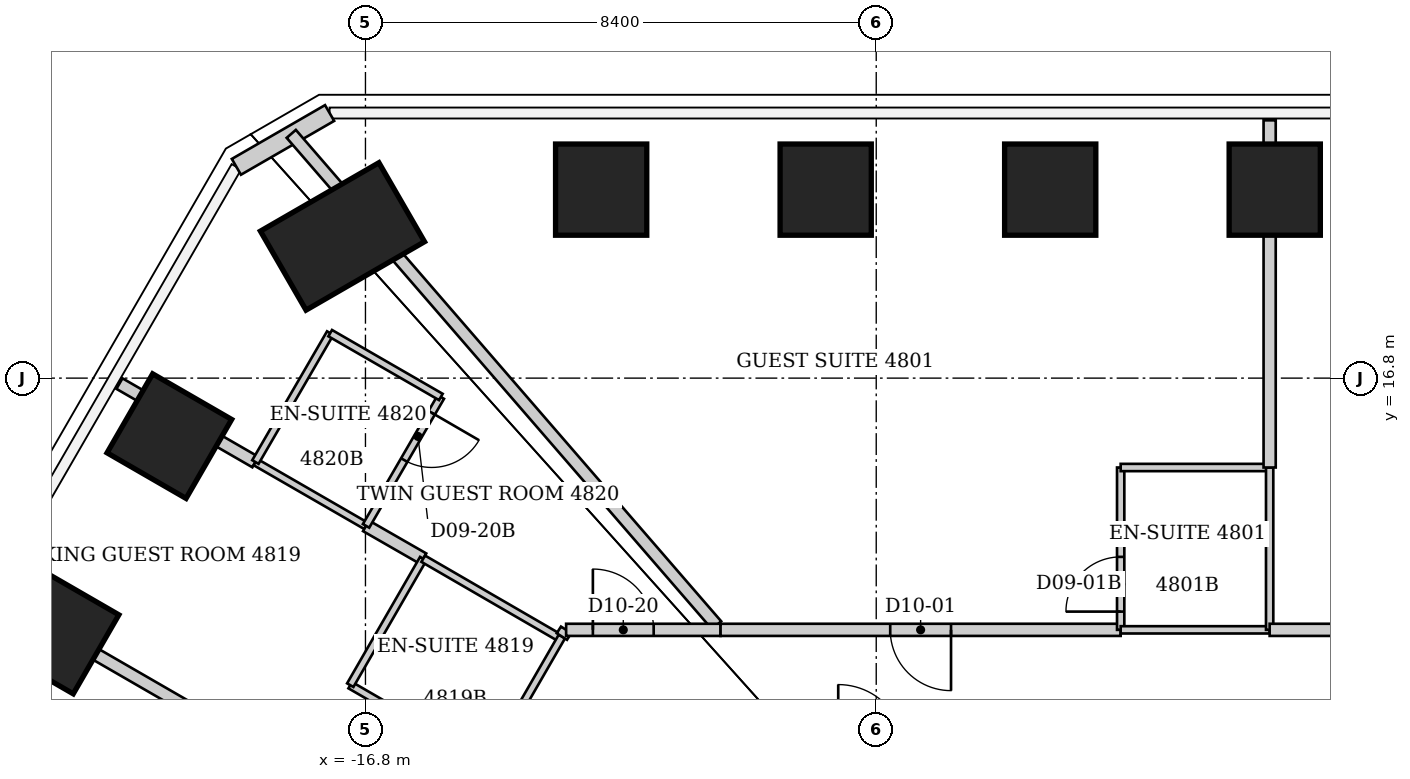
"""IFC4 building model, lengths in metres.
Left out: names, types, materials, properties, quantities, classifications, styles, units other than length and angle.
Written with IfcOpenShell. Run it as: python <this file> out.ifc"""

import sys

from ifc_helpers import new_model, si_unit, direction, frame, frame_2d, origin, origin_2d, place, context, subcontext, project, spatial, rectangle, extrude, element, fill, save


model = new_model("IFC4")
c1 = context("Model", 3, precision=1e-05, world=origin(), true_north=direction((0.0, 1.0)))
c2 = subcontext(c1, "Body", "Model", "MODEL_VIEW")
j1 = project(units=[si_unit("LENGTHUNIT", "METRE"), si_unit("PLANEANGLEUNIT", "RADIAN")], contexts=[c1])
p1 = place(None, origin())
s1 = spatial("IfcSite", under=j1, at=p1, CompositionType="ELEMENT")
p2 = place(p1, origin())
s2 = spatial("IfcBuilding", under=s1, at=p2, CompositionType="ELEMENT")
p3 = place(p2, frame((0.0, 0.0, 194.6)))
s3 = spatial("IfcBuildingStorey", under=s2, at=p3, CompositionType="ELEMENT", Elevation=194.6)
for number, where, z_axis, x_axis in (
    (1, (-12.924, 19.9, 0.0), (0.0, 0.0, 1.0), (0.0, 1.0, 0.0)),
    (2, (-9.231, 19.9, 0.0), (0.0, 0.0, 1.0), (0.0, 1.0, 0.0)),
    (3, (-5.539, 19.9, 0.0), (0.0, 0.0, 1.0), (0.0, 1.0, 0.0)),
    (4, (-1.846, 19.9, 0.0), (0.0, 0.0, 1.0), (0.0, 1.0, 0.0)),
    (5, (-21.88, 12.633, 0.0), (0.0, 0.0, 1.0), (-0.866, 0.5, 0.0)),
    (6, (-20.025, 15.846, 0.0), (0.0, 0.0, 1.0), (-0.866, 0.5, 0.0)),
):
    element("IfcColumn", number, at=place(p3, frame(where, z_axis=z_axis, x_axis=x_axis)), inside=s3, PredefinedType="COLUMN", context=c2, shape_type="SweptSolid", body=[
        extrude(rectangle(XDim=1.5, YDim=1.5, at=origin_2d()), origin(), (0.0, 0.0, 1.0), 3.8),
    ])
p4 = place(p3, frame((-17.178, 19.131, 0.0), z_axis=(0.0, 0.0, 1.0), x_axis=(-0.5, 0.866025403784, 0.0)))
e7 = element("IfcColumn", 7, at=p4, inside=s3, PredefinedType="COLUMN", context=c2, shape_type="SweptSolid", body=[
    extrude(rectangle(XDim=1.5, YDim=2.25, at=origin_2d()), origin(), (0.0, 0.0, 1.0), 3.8),
])
p5 = place(p3, frame((-18.923, 20.275, 0.0), z_axis=(0.0, 0.0, 1.0), x_axis=(0.866036293601, 0.499981137809, 0.0)))
e8 = element("IfcWall", 8, at=p5, inside=s3, PredefinedType="SOLIDWALL", context=c2, shape_type="SweptSolid", body=[
    extrude(rectangle(XDim=1.77, YDim=0.3, at=frame_2d((0.885, 0.0))), origin(), (0.0, 0.0, 1.0), 3.64),
])
p6 = place(p3, frame((-22.866, 13.2, 0.0), z_axis=(0.0, 0.0, 1.0), x_axis=(0.865937714159, -0.500151852138, 0.0)))
e9 = element("IfcWall", 9, at=p6, inside=s3, PredefinedType="PARTITIONING", context=c2, shape_type="SweptSolid", body=[
    extrude(rectangle(XDim=5.758, YDim=0.2, at=frame_2d((2.879, 0.0))), origin(), (0.0, 0.0, 1.0), 2.878),
])
p7 = place(p3, frame((-20.846, 16.71, 0.0), z_axis=(0.0, 0.0, 1.0), x_axis=(0.866163541035, -0.499760662899, 0.0)))
e10 = element("IfcWall", 10, at=p7, inside=s3, PredefinedType="PARTITIONING", context=c2, shape_type="SweptSolid", body=[
    extrude(rectangle(XDim=2.581, YDim=0.2, at=frame_2d((1.291, 0.0))), origin(), (0.0, 0.0, 1.0), 3.64),
])
p8 = place(p3, frame((-18.61, 15.42, 0.0), z_axis=(0.0, 0.0, 1.0), x_axis=(0.86618365172, -0.499725806311, 0.0)))
e11 = element("IfcWall", 11, at=p8, inside=s3, PredefinedType="PARTITIONING", context=c2, shape_type="SweptSolid", body=[
    extrude(rectangle(XDim=2.101, YDim=0.12, at=frame_2d((1.051, 0.0))), origin(), (0.0, 0.0, 1.0), 3.64),
])
p9 = place(p3, frame((-17.38, 17.54, 0.0), z_axis=(0.0, 0.0, 1.0), x_axis=(-0.501888006485, -0.864932615264, 0.0)))
e12 = element("IfcWall", 12, at=p9, inside=s3, PredefinedType="PARTITIONING", context=c2, shape_type="SweptSolid", body=[
    extrude(rectangle(XDim=2.451, YDim=0.12, at=frame_2d((1.226, 0.0))), origin(), (0.0, 0.0, 1.0), 3.64),
])
p10 = place(p3, frame((-17.05, 11.75, 0.0), z_axis=(0.0, 0.0, 1.0), x_axis=(0.865155281359, -0.50150407689, 0.0)))
e13 = element("IfcWall", 13, at=p10, inside=s3, PredefinedType="PARTITIONING", context=c2, shape_type="SweptSolid", body=[
    extrude(rectangle(XDim=2.612, YDim=0.12, at=frame_2d((1.306, 0.0))), origin(), (0.0, 0.0, 1.0), 3.64),
])
p11 = place(p10, frame((1.412, 0.0, 0.0)))
e14 = element("IfcOpeningElement", 14, at=p11, cuts=e13, PredefinedType="OPENING", context=c2, shape_type="SweptSolid", body=[
    extrude(rectangle(XDim=0.9, YDim=2.03, at=frame_2d((0.45, 1.015))), frame((0.0, 0.06, 0.0), z_axis=(0.0, -1.0, 0.0), x_axis=(1.0, 0.0, 0.0)), (0.0, 0.0, 1.0), 0.12),
])
p12 = place(p3, frame((-16.79, 14.37, 0.0), z_axis=(0.0, 0.0, 1.0), x_axis=(0.867132442133, -0.498077632303, 0.0)))
e15 = element("IfcWall", 15, at=p12, inside=s3, PredefinedType="PARTITIONING", context=c2, shape_type="SweptSolid", body=[
    extrude(rectangle(XDim=1.084, YDim=0.2, at=frame_2d((0.542, 0.0))), origin(), (0.0, 0.0, 1.0), 3.64),
])
p13 = place(p3, frame((-16.79, 14.37, 0.0), z_axis=(0.0, 0.0, 1.0), x_axis=(0.501856726365, 0.86495076519, 0.0)))
e16 = element("IfcWall", 16, at=p13, inside=s3, PredefinedType="PARTITIONING", context=c2, shape_type="SweptSolid", body=[
    extrude(rectangle(XDim=2.451, YDim=0.12, at=frame_2d((1.226, 0.0))), origin(), (0.0, 0.0, 1.0), 3.64),
])
p14 = place(p13, frame((1.251, 0.0, 0.0)))
e17 = element("IfcOpeningElement", 17, at=p14, cuts=e16, PredefinedType="OPENING", context=c2, shape_type="SweptSolid", body=[
    extrude(rectangle(XDim=0.9, YDim=2.03, at=frame_2d((0.45, 1.015))), frame((0.0, 0.06, 0.0), z_axis=(0.0, -1.0, 0.0), x_axis=(1.0, 0.0, 0.0)), (0.0, 0.0, 1.0), 0.12),
])
p15 = place(p3, frame((-15.85, 13.83, 0.0), z_axis=(0.0, 0.0, 1.0), x_axis=(-0.499693115345, -0.866202511239, 0.0)))
e18 = element("IfcWall", 18, at=p15, inside=s3, PredefinedType="PARTITIONING", context=c2, shape_type="SweptSolid", body=[
    extrude(rectangle(XDim=2.401, YDim=0.12, at=frame_2d((1.201, 0.0))), origin(), (0.0, 0.0, 1.0), 3.64),
])
p16 = place(p3, frame((-15.85, 13.83, 0.0), z_axis=(0.0, 0.0, 1.0), x_axis=(0.865155281359, -0.50150407689, 0.0)))
e19 = element("IfcWall", 19, at=p16, inside=s3, PredefinedType="PARTITIONING", context=c2, shape_type="SweptSolid", body=[
    extrude(rectangle(XDim=2.612, YDim=0.12, at=frame_2d((1.306, 0.0))), origin(), (0.0, 0.0, 1.0), 3.64),
])
p17 = place(p3, frame((-15.56, 16.49, 0.0), z_axis=(0.0, 0.0, 1.0), x_axis=(-0.86618365172, 0.499725806311, 0.0)))
e20 = element("IfcWall", 20, at=p17, inside=s3, PredefinedType="PARTITIONING", context=c2, shape_type="SweptSolid", body=[
    extrude(rectangle(XDim=2.101, YDim=0.12, at=frame_2d((1.051, 0.0))), origin(), (0.0, 0.0, 1.0), 3.64),
])
p18 = place(p3, frame((-14.789, 10.439, 0.0), z_axis=(0.0, 0.0, 1.0), x_axis=(0.499942119333, 0.866058818624, 0.0)))
e21 = element("IfcWall", 21, at=p18, inside=s3, PredefinedType="PARTITIONING", context=c2, shape_type="SweptSolid", body=[
    extrude(rectangle(XDim=2.437, YDim=0.12, at=frame_2d((1.219, 0.0))), origin(), (0.0, 0.0, 1.0), 3.64),
])
p19 = place(p3, frame((-13.5, 12.66, 0.0), z_axis=(0.0, 0.0, 1.0), x_axis=(-0.537723852201, -0.843121022614, 0.0)))
e22 = element("IfcWall", 22, at=p19, inside=s3, PredefinedType="PARTITIONING", context=c2, shape_type="SweptSolid", body=[
    extrude(rectangle(XDim=0.13, YDim=0.2, at=frame_2d((0.065, 0.0))), origin(), (0.0, 0.0, 1.0), 3.64),
])
p20 = place(p3, frame((-11.025, 12.736, 0.0), z_axis=(0.0, 0.0, 1.0), x_axis=(-0.654431245438, 0.756121514702, 0.0)))
e23 = element("IfcWall", 23, at=p20, inside=s3, PredefinedType="PARTITIONING", context=c2, shape_type="SweptSolid", body=[
    extrude(rectangle(XDim=10.688, YDim=0.2, at=frame_2d((5.344, 0.0))), origin(), (0.0, 0.0, 1.0), 3.64),
])
p21 = place(p3, frame((-10.96, 12.66, 0.0), z_axis=(0.0, 0.0, 1.0), x_axis=(-1.0, 0.0, 0.0)))
e24 = element("IfcWall", 24, at=p21, inside=s3, PredefinedType="PARTITIONING", context=c2, shape_type="SweptSolid", body=[
    extrude(rectangle(XDim=2.54, YDim=0.2, at=frame_2d((1.27, 0.0))), origin(), (0.0, 0.0, 1.0), 3.64),
])
p22 = place(p21, frame((1.1, 0.0, 0.0)))
e25 = element("IfcOpeningElement", 25, at=p22, cuts=e24, PredefinedType="OPENING", context=c2, shape_type="SweptSolid", body=[
    extrude(rectangle(XDim=1.0, YDim=2.13, at=frame_2d((0.5, 1.065))), frame((0.0, 0.1, 0.0), z_axis=(0.0, -1.0, 0.0), x_axis=(1.0, 0.0, 0.0)), (0.0, 0.0, 1.0), 0.2),
])
p23 = place(p3, frame((-4.38, 12.66, 0.0), z_axis=(0.0, 0.0, 1.0), x_axis=(-1.0, 0.0, 0.0)))
e26 = element("IfcWall", 26, at=p23, inside=s3, PredefinedType="PARTITIONING", context=c2, shape_type="SweptSolid", body=[
    extrude(rectangle(XDim=6.58, YDim=0.2, at=frame_2d((3.29, 0.0))), origin(), (0.0, 0.0, 1.0), 3.64),
])
p24 = place(p23, frame((2.79, 0.0, 0.0)))
e27 = element("IfcOpeningElement", 27, at=p24, cuts=e26, PredefinedType="OPENING", context=c2, shape_type="SweptSolid", body=[
    extrude(rectangle(XDim=1.0, YDim=2.13, at=frame_2d((0.5, 1.065))), frame((0.0, 0.1, 0.0), z_axis=(0.0, -1.0, 0.0), x_axis=(1.0, 0.0, 0.0)), (0.0, 0.0, 1.0), 0.2),
])
p25 = place(p3, frame((-4.38, 15.33, 0.0), z_axis=(0.0, 0.0, 1.0), x_axis=(0.0, -1.0, 0.0)))
e28 = element("IfcWall", 28, at=p25, inside=s3, PredefinedType="PARTITIONING", context=c2, shape_type="SweptSolid", body=[
    extrude(rectangle(XDim=2.67, YDim=0.12, at=frame_2d((1.335, 0.0))), origin(), (0.0, 0.0, 1.0), 3.64),
])
p26 = place(p25, frame((1.47, 0.0, 0.0)))
e29 = element("IfcOpeningElement", 29, at=p26, cuts=e28, PredefinedType="OPENING", context=c2, shape_type="SweptSolid", body=[
    extrude(rectangle(XDim=0.9, YDim=2.03, at=frame_2d((0.45, 1.015))), frame((0.0, 0.06, 0.0), z_axis=(0.0, -1.0, 0.0), x_axis=(1.0, 0.0, 0.0)), (0.0, 0.0, 1.0), 0.12),
])
for number, where, z_axis, x_axis in (
    (30, (-1.93, 12.66, 0.0), (0.0, 0.0, 1.0), (-1.0, 0.0, 0.0)),
    (31, (-1.93, 15.33, 0.0), (0.0, 0.0, 1.0), (-1.0, 0.0, 0.0)),
):
    element("IfcWall", number, at=place(p3, frame(where, z_axis=z_axis, x_axis=x_axis)), inside=s3, PredefinedType="PARTITIONING", context=c2, shape_type="SweptSolid", body=[
        extrude(rectangle(XDim=2.45, YDim=0.12, at=frame_2d((1.225, 0.0))), origin(), (0.0, 0.0, 1.0), 3.64),
    ])
p27 = place(p3, frame((-1.93, 15.33, 0.0), z_axis=(0.0, 0.0, 1.0), x_axis=(0.0, -1.0, 0.0)))
e32 = element("IfcWall", 32, at=p27, inside=s3, PredefinedType="PARTITIONING", context=c2, shape_type="SweptSolid", body=[
    extrude(rectangle(XDim=2.67, YDim=0.12, at=frame_2d((1.335, 0.0))), origin(), (0.0, 0.0, 1.0), 3.023),
])
p28 = place(p3, frame((-1.93, 21.04, 0.0), z_axis=(0.0, 0.0, 1.0), x_axis=(0.0, -1.0, 0.0)))
e33 = element("IfcWall", 33, at=p28, inside=s3, PredefinedType="PARTITIONING", context=c2, shape_type="SweptSolid", body=[
    extrude(rectangle(XDim=5.71, YDim=0.2, at=frame_2d((2.855, 0.0))), origin(), (0.0, 0.0, 1.0), 3.023),
])
p29 = place(p3, frame((3.35, 12.66, 0.0), z_axis=(0.0, 0.0, 1.0), x_axis=(-1.0, 0.0, 0.0)))
e34 = element("IfcWall", 34, at=p29, inside=s3, PredefinedType="PARTITIONING", context=c2, shape_type="SweptSolid", body=[
    extrude(rectangle(XDim=5.28, YDim=0.2, at=frame_2d((2.64, 0.0))), origin(), (0.0, 0.0, 1.0), 3.64),
])
p30 = place(p29, frame((2.14, 0.0, 0.0)))
e35 = element("IfcOpeningElement", 35, at=p30, cuts=e34, PredefinedType="OPENING", context=c2, shape_type="SweptSolid", body=[
    extrude(rectangle(XDim=1.0, YDim=2.13, at=frame_2d((0.5, 1.065))), frame((0.0, 0.1, 0.0), z_axis=(0.0, -1.0, 0.0), x_axis=(1.0, 0.0, 0.0)), (0.0, 0.0, 1.0), 0.2),
])
p31 = place(p24, origin())
e36 = element("IfcDoor", 36, at=p31, inside=s3, OperationType="SINGLE_SWING_LEFT", PredefinedType="DOOR", context=c2, shape_type="SweptSolid", body=[
    extrude(rectangle(XDim=1.0, YDim=2.13, at=frame_2d((0.5, 1.065))), frame((0.0, 0.025, 0.0), z_axis=(0.0, -1.0, 0.0), x_axis=(1.0, 0.0, 0.0)), (0.0, 0.0, 1.0), 0.05),
])
fill(e27, e36)
p32 = place(p26, origin())
e37 = element("IfcDoor", 37, at=p32, inside=s3, OperationType="SINGLE_SWING_RIGHT", PredefinedType="DOOR", context=c2, shape_type="SweptSolid", body=[
    extrude(rectangle(XDim=0.9, YDim=2.03, at=frame_2d((0.45, 1.015))), frame((0.0, 0.025, 0.0), z_axis=(0.0, -1.0, 0.0), x_axis=(1.0, 0.0, 0.0)), (0.0, 0.0, 1.0), 0.05),
])
fill(e29, e37)
p33 = place(p22, origin())
e38 = element("IfcDoor", 38, at=p33, inside=s3, OperationType="SINGLE_SWING_RIGHT", PredefinedType="DOOR", context=c2, shape_type="SweptSolid", body=[
    extrude(rectangle(XDim=1.0, YDim=2.13, at=frame_2d((0.5, 1.065))), frame((0.0, 0.025, 0.0), z_axis=(0.0, -1.0, 0.0), x_axis=(1.0, 0.0, 0.0)), (0.0, 0.0, 1.0), 0.05),
])
fill(e25, e38)
p34 = place(p14, origin())
e39 = element("IfcDoor", 39, at=p34, inside=s3, OperationType="SINGLE_SWING_RIGHT", PredefinedType="DOOR", context=c2, shape_type="SweptSolid", body=[
    extrude(rectangle(XDim=0.9, YDim=2.03, at=frame_2d((0.45, 1.015))), frame((0.0, 0.025, 0.0), z_axis=(0.0, -1.0, 0.0), x_axis=(1.0, 0.0, 0.0)), (0.0, 0.0, 1.0), 0.05),
])
fill(e17, e39)
save(model, sys.argv[1])
